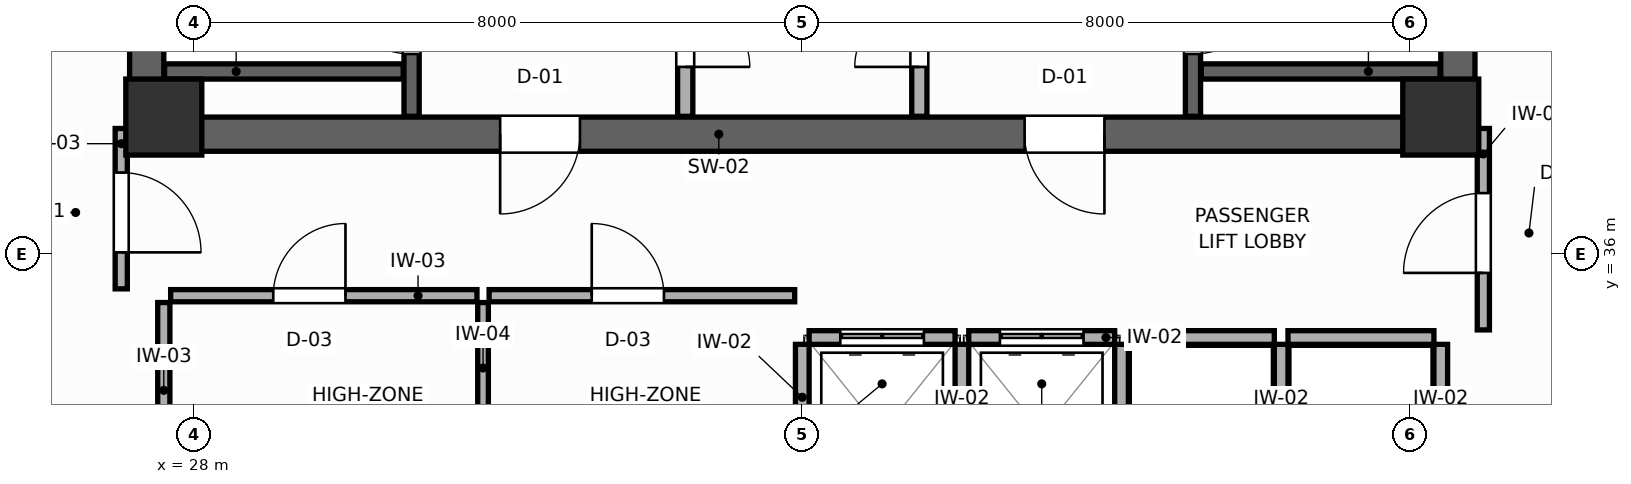
"""IFC4 building model, lengths in metres.
Left out: names, types, materials, properties, quantities, classifications, styles, units other than length and angle.
Written with IfcOpenShell. Run it as: python <this file> out.ifc"""

import sys

from ifc_helpers import new_model, si_unit, direction, frame, frame_2d, origin, origin_2d, place, context, subcontext, project, spatial, rectangle, extrude, source, transform, mapped, element, fill, save


model = new_model("IFC4")
c1 = context("Model", 3, precision=1e-05, world=origin(), true_north=direction((0.0, 1.0)))
c2 = subcontext(c1, "Body", "Model", "MODEL_VIEW")
j1 = project(units=[si_unit("LENGTHUNIT", "METRE"), si_unit("PLANEANGLEUNIT", "RADIAN")], contexts=[c1])
p1 = place(None, origin())
s1 = spatial("IfcSite", under=j1, at=p1, CompositionType="ELEMENT")
p2 = place(p1, origin())
s2 = spatial("IfcBuilding", under=s1, at=p2, CompositionType="ELEMENT")
p3 = place(p2, frame((0.0, 0.0, 175.8)))
s3 = spatial("IfcBuildingStorey", under=s2, at=p3, CompositionType="ELEMENT", Elevation=175.8)
p4 = place(p3, frame((27.15, 37.575, 0.0), z_axis=(0.0, 0.0, 1.0), x_axis=(1.0, 0.0, 0.0)))
e1 = element("IfcWall", 1, at=p4, inside=s3, PredefinedType="SHEAR", context=c2, shape_type="SweptSolid", body=[
    extrude(rectangle(XDim=17.7, YDim=0.45, at=frame_2d((8.85, 0.0))), origin(), (0.0, 0.0, 1.0), 3.6),
])
p5 = place(p4, frame((4.875, 0.0, 0.0)))
e2 = element("IfcOpeningElement", 2, at=p5, cuts=e1, PredefinedType="OPENING", context=c2, shape_type="SweptSolid", body=[
    extrude(rectangle(XDim=1.05, YDim=2.1, at=frame_2d((0.525, 1.05))), frame((0.0, 0.235, 0.0), z_axis=(0.0, -1.0, 0.0), x_axis=(1.0, 0.0, 0.0)), (0.0, 0.0, 1.0), 0.47),
])
p6 = place(p4, frame((11.775, 0.0, 0.0)))
e3 = element("IfcOpeningElement", 3, at=p6, cuts=e1, PredefinedType="OPENING", context=c2, shape_type="SweptSolid", body=[
    extrude(rectangle(XDim=1.05, YDim=2.1, at=frame_2d((0.525, 1.05))), frame((0.0, 0.235, 0.0), z_axis=(0.0, -1.0, 0.0), x_axis=(1.0, 0.0, 0.0)), (0.0, 0.0, 1.0), 0.47),
])
for number, where, z_axis, x_axis in (
    (4, (27.375, 37.8, 0.0), (0.0, 0.0, 1.0), (0.0, 1.0, 0.0)),
    (5, (44.625, 37.8, 0.0), (0.0, 0.0, 1.0), (0.0, 1.0, 0.0)),
):
    element("IfcWall", number, at=place(p3, frame(where, z_axis=z_axis, x_axis=x_axis)), inside=s3, PredefinedType="SHEAR", context=c2, shape_type="SweptSolid", body=[
        extrude(rectangle(XDim=9.0, YDim=0.45, at=frame_2d((4.5, 0.0))), origin(), (0.0, 0.0, 1.0), 3.6),
    ])
m1 = source(origin(), c2, "Body", "SweptSolid", [
    extrude(rectangle(XDim=1.0, YDim=1.0, at=origin_2d()), origin(), (0.0, 0.0, 1.0), 3.6),
])
for number, where, z_axis, x_axis in (
    (6, (27.6, 37.8, 0.0), (0.0, 0.0, 1.0), (1.0, 0.0, 0.0)),
    (7, (44.4, 37.8, 0.0), (0.0, 0.0, 1.0), (1.0, 0.0, 0.0)),
):
    element("IfcColumn", number, at=place(p3, frame(where, z_axis=z_axis, x_axis=x_axis)), inside=s3, PredefinedType="COLUMN", context=c2, shape_type="MappedRepresentation", body=[
        mapped(m1, transform((0.0, 0.0, 0.0), scale=1.0)),
    ])
p7 = place(p3, frame((30.86, 37.81, 0.0), z_axis=(0.0, 0.0, 1.0), x_axis=(0.0, 1.0, 0.0)))
e8 = element("IfcWall", 8, at=p7, inside=s3, PredefinedType="SHEAR", context=c2, shape_type="SweptSolid", body=[
    extrude(rectangle(XDim=8.98, YDim=0.2, at=frame_2d((4.49, 0.0))), origin(), (0.0, 0.0, 1.0), 3.6),
])
p8 = place(p7, frame((0.82, 0.0, 0.0)))
e9 = element("IfcOpeningElement", 9, at=p8, cuts=e8, PredefinedType="OPENING", context=c2, shape_type="SweptSolid", body=[
    extrude(rectangle(XDim=1.05, YDim=2.1, at=frame_2d((0.525, 1.05))), frame((0.0, 0.11, 0.0), z_axis=(0.0, -1.0, 0.0), x_axis=(1.0, 0.0, 0.0)), (0.0, 0.0, 1.0), 0.22),
])
p9 = place(p3, frame((27.61, 38.4, 0.0), z_axis=(0.0, 0.0, 1.0), x_axis=(1.0, 0.0, 0.0)))
e10 = element("IfcWall", 10, at=p9, inside=s3, PredefinedType="SHEAR", context=c2, shape_type="SweptSolid", body=[
    extrude(rectangle(XDim=3.14, YDim=0.2, at=frame_2d((1.57, 0.0))), origin(), (0.0, 0.0, 1.0), 3.6),
])
p10 = place(p3, frame((41.14, 37.81, 0.0), z_axis=(0.0, 0.0, 1.0), x_axis=(0.0, 1.0, 0.0)))
e11 = element("IfcWall", 11, at=p10, inside=s3, PredefinedType="SHEAR", context=c2, shape_type="SweptSolid", body=[
    extrude(rectangle(XDim=8.98, YDim=0.2, at=frame_2d((4.49, 0.0))), origin(), (0.0, 0.0, 1.0), 3.6),
])
p11 = place(p10, frame((0.82, 0.0, 0.0)))
e12 = element("IfcOpeningElement", 12, at=p11, cuts=e11, PredefinedType="OPENING", context=c2, shape_type="SweptSolid", body=[
    extrude(rectangle(XDim=1.05, YDim=2.1, at=frame_2d((0.525, 1.05))), frame((0.0, 0.11, 0.0), z_axis=(0.0, -1.0, 0.0), x_axis=(1.0, 0.0, 0.0)), (0.0, 0.0, 1.0), 0.22),
])
p12 = place(p3, frame((41.25, 38.4, 0.0), z_axis=(0.0, 0.0, 1.0), x_axis=(1.0, 0.0, 0.0)))
e13 = element("IfcWall", 13, at=p12, inside=s3, PredefinedType="SHEAR", context=c2, shape_type="SweptSolid", body=[
    extrude(rectangle(XDim=3.14, YDim=0.2, at=frame_2d((1.57, 0.0))), origin(), (0.0, 0.0, 1.0), 3.6),
])
p13 = place(p3, frame((34.46, 37.81, 0.0), z_axis=(0.0, 0.0, 1.0), x_axis=(0.0, 1.0, 0.0)))
e14 = element("IfcWall", 14, at=p13, inside=s3, PredefinedType="PARTITIONING", context=c2, shape_type="SweptSolid", body=[
    extrude(rectangle(XDim=8.98, YDim=0.2, at=frame_2d((4.49, 0.0))), origin(), (0.0, 0.0, 1.0), 3.4),
])
p14 = place(p13, frame((0.65, 0.0, 0.0)))
e15 = element("IfcOpeningElement", 15, at=p14, cuts=e14, PredefinedType="OPENING", context=c2, shape_type="SweptSolid", body=[
    extrude(rectangle(XDim=0.85, YDim=2.05, at=frame_2d((0.425, 1.025))), frame((0.0, 0.11, 0.0), z_axis=(0.0, -1.0, 0.0), x_axis=(1.0, 0.0, 0.0)), (0.0, 0.0, 1.0), 0.22),
])
p15 = place(p3, frame((37.54, 37.81, 0.0), z_axis=(0.0, 0.0, 1.0), x_axis=(0.0, 1.0, 0.0)))
e16 = element("IfcWall", 16, at=p15, inside=s3, PredefinedType="PARTITIONING", context=c2, shape_type="SweptSolid", body=[
    extrude(rectangle(XDim=8.98, YDim=0.2, at=frame_2d((4.49, 0.0))), origin(), (0.0, 0.0, 1.0), 3.4),
])
p16 = place(p15, frame((0.65, 0.0, 0.0)))
e17 = element("IfcOpeningElement", 17, at=p16, cuts=e16, PredefinedType="OPENING", context=c2, shape_type="SweptSolid", body=[
    extrude(rectangle(XDim=0.85, YDim=2.05, at=frame_2d((0.425, 1.025))), frame((0.0, 0.11, 0.0), z_axis=(0.0, -1.0, 0.0), x_axis=(1.0, 0.0, 0.0)), (0.0, 0.0, 1.0), 0.22),
])
p17 = place(p3, frame((36.09, 34.9, 0.0), z_axis=(0.0, 0.0, 1.0), x_axis=(1.0, 0.0, 0.0)))
e18 = element("IfcWall", 18, at=p17, inside=s3, PredefinedType="PARTITIONING", context=c2, shape_type="SweptSolid", body=[
    extrude(rectangle(XDim=1.92, YDim=0.18, at=frame_2d((0.96, 0.0))), origin(), (0.0, 0.0, 1.0), 3.4),
])
p18 = place(p17, frame((0.41, 0.0, 0.0)))
e19 = element("IfcOpeningElement", 19, at=p18, cuts=e18, PredefinedType="OPENING", context=c2, shape_type="SweptSolid", body=[
    extrude(rectangle(XDim=1.1, YDim=2.1, at=frame_2d((0.55, 1.05))), frame((0.0, 0.1, 0.0), z_axis=(0.0, -1.0, 0.0), x_axis=(1.0, 0.0, 0.0)), (0.0, 0.0, 1.0), 0.2),
])
p19 = place(p3, frame((36.0, 32.49, 0.0), z_axis=(0.0, 0.0, 1.0), x_axis=(0.0, 1.0, 0.0)))
e20 = element("IfcWall", 20, at=p19, inside=s3, PredefinedType="PARTITIONING", context=c2, shape_type="SweptSolid", body=[
    extrude(rectangle(XDim=2.32, YDim=0.18, at=frame_2d((1.16, 0.0))), origin(), (0.0, 0.0, 1.0), 3.4),
])
p20 = place(p3, frame((38.19, 34.9, 0.0), z_axis=(0.0, 0.0, 1.0), x_axis=(1.0, 0.0, 0.0)))
e21 = element("IfcWall", 21, at=p20, inside=s3, PredefinedType="PARTITIONING", context=c2, shape_type="SweptSolid", body=[
    extrude(rectangle(XDim=1.92, YDim=0.18, at=frame_2d((0.96, 0.0))), origin(), (0.0, 0.0, 1.0), 3.4),
])
p21 = place(p20, frame((0.41, 0.0, 0.0)))
e22 = element("IfcOpeningElement", 22, at=p21, cuts=e21, PredefinedType="OPENING", context=c2, shape_type="SweptSolid", body=[
    extrude(rectangle(XDim=1.1, YDim=2.1, at=frame_2d((0.55, 1.05))), frame((0.0, 0.1, 0.0), z_axis=(0.0, -1.0, 0.0), x_axis=(1.0, 0.0, 0.0)), (0.0, 0.0, 1.0), 0.2),
])
p22 = place(p3, frame((38.1, 32.49, 0.0), z_axis=(0.0, 0.0, 1.0), x_axis=(0.0, 1.0, 0.0)))
e23 = element("IfcWall", 23, at=p22, inside=s3, PredefinedType="PARTITIONING", context=c2, shape_type="SweptSolid", body=[
    extrude(rectangle(XDim=2.32, YDim=0.18, at=frame_2d((1.16, 0.0))), origin(), (0.0, 0.0, 1.0), 3.4),
])
p23 = place(p3, frame((40.29, 34.9, 0.0), z_axis=(0.0, 0.0, 1.0), x_axis=(1.0, 0.0, 0.0)))
e24 = element("IfcWall", 24, at=p23, inside=s3, PredefinedType="PARTITIONING", context=c2, shape_type="SweptSolid", body=[
    extrude(rectangle(XDim=1.92, YDim=0.18, at=frame_2d((0.96, 0.0))), origin(), (0.0, 0.0, 1.0), 3.4),
])
p24 = place(p3, frame((40.2, 32.49, 0.0), z_axis=(0.0, 0.0, 1.0), x_axis=(0.0, 1.0, 0.0)))
e25 = element("IfcWall", 25, at=p24, inside=s3, PredefinedType="PARTITIONING", context=c2, shape_type="SweptSolid", body=[
    extrude(rectangle(XDim=2.32, YDim=0.18, at=frame_2d((1.16, 0.0))), origin(), (0.0, 0.0, 1.0), 3.4),
])
p25 = place(p3, frame((42.39, 34.9, 0.0), z_axis=(0.0, 0.0, 1.0), x_axis=(1.0, 0.0, 0.0)))
e26 = element("IfcWall", 26, at=p25, inside=s3, PredefinedType="PARTITIONING", context=c2, shape_type="SweptSolid", body=[
    extrude(rectangle(XDim=1.92, YDim=0.18, at=frame_2d((0.96, 0.0))), origin(), (0.0, 0.0, 1.0), 3.4),
])
for number, where, z_axis, x_axis in (
    (27, (42.3, 32.49, 0.0), (0.0, 0.0, 1.0), (0.0, 1.0, 0.0)),
    (28, (44.4, 32.49, 0.0), (0.0, 0.0, 1.0), (0.0, 1.0, 0.0)),
):
    element("IfcWall", number, at=place(p3, frame(where, z_axis=z_axis, x_axis=x_axis)), inside=s3, PredefinedType="PARTITIONING", context=c2, shape_type="SweptSolid", body=[
        extrude(rectangle(XDim=2.32, YDim=0.18, at=frame_2d((1.16, 0.0))), origin(), (0.0, 0.0, 1.0), 3.4),
    ])
p26 = place(p3, frame((27.6, 33.05, 0.0), z_axis=(0.0, 0.0, 1.0), x_axis=(0.0, 1.0, 0.0)))
e29 = element("IfcWall", 29, at=p26, inside=s3, PredefinedType="PARTITIONING", context=c2, shape_type="SweptSolid", body=[
    extrude(rectangle(XDim=2.31, YDim=0.16, at=frame_2d((1.155, 0.0))), origin(), (0.0, 0.0, 1.0), 3.4),
])
p27 = place(p3, frame((31.8, 32.49, 0.0), z_axis=(0.0, 0.0, 1.0), x_axis=(0.0, 1.0, 0.0)))
e30 = element("IfcWall", 30, at=p27, inside=s3, PredefinedType="PARTITIONING", context=c2, shape_type="SweptSolid", body=[
    extrude(rectangle(XDim=2.87, YDim=0.14, at=frame_2d((1.435, 0.0))), origin(), (0.0, 0.0, 1.0), 3.4),
])
p28 = place(p3, frame((27.69, 35.45, 0.0), z_axis=(0.0, 0.0, 1.0), x_axis=(1.0, 0.0, 0.0)))
e31 = element("IfcWall", 31, at=p28, inside=s3, PredefinedType="PARTITIONING", context=c2, shape_type="SweptSolid", body=[
    extrude(rectangle(XDim=4.03, YDim=0.16, at=frame_2d((2.015, 0.0))), origin(), (0.0, 0.0, 1.0), 3.4),
])
p29 = place(p28, frame((1.35, 0.0, 0.0)))
e32 = element("IfcOpeningElement", 32, at=p29, cuts=e31, PredefinedType="OPENING", context=c2, shape_type="SweptSolid", body=[
    extrude(rectangle(XDim=0.95, YDim=2.05, at=frame_2d((0.475, 1.025))), frame((0.0, 0.09, 0.0), z_axis=(0.0, -1.0, 0.0), x_axis=(1.0, 0.0, 0.0)), (0.0, 0.0, 1.0), 0.18),
])
p30 = place(p3, frame((31.88, 35.45, 0.0), z_axis=(0.0, 0.0, 1.0), x_axis=(1.0, 0.0, 0.0)))
e33 = element("IfcWall", 33, at=p30, inside=s3, PredefinedType="PARTITIONING", context=c2, shape_type="SweptSolid", body=[
    extrude(rectangle(XDim=4.02, YDim=0.16, at=frame_2d((2.01, 0.0))), origin(), (0.0, 0.0, 1.0), 3.4),
])
p31 = place(p30, frame((1.35, 0.0, 0.0)))
e34 = element("IfcOpeningElement", 34, at=p31, cuts=e33, PredefinedType="OPENING", context=c2, shape_type="SweptSolid", body=[
    extrude(rectangle(XDim=0.95, YDim=2.05, at=frame_2d((0.475, 1.025))), frame((0.0, 0.09, 0.0), z_axis=(0.0, -1.0, 0.0), x_axis=(1.0, 0.0, 0.0)), (0.0, 0.0, 1.0), 0.18),
])
p32 = place(p3, frame((27.04, 35.54, 0.0), z_axis=(0.0, 0.0, 1.0), x_axis=(0.0, 1.0, 0.0)))
e35 = element("IfcWall", 35, at=p32, inside=s3, PredefinedType="PARTITIONING", context=c2, shape_type="SweptSolid", body=[
    extrude(rectangle(XDim=2.11, YDim=0.16, at=frame_2d((1.055, 0.0))), origin(), (0.0, 0.0, 1.0), 3.4),
])
p33 = place(p32, frame((0.48, 0.0, 0.0)))
e36 = element("IfcOpeningElement", 36, at=p33, cuts=e35, PredefinedType="OPENING", context=c2, shape_type="SweptSolid", body=[
    extrude(rectangle(XDim=1.05, YDim=2.1, at=frame_2d((0.525, 1.05))), frame((0.0, 0.09, 0.0), z_axis=(0.0, -1.0, 0.0), x_axis=(1.0, 0.0, 0.0)), (0.0, 0.0, 1.0), 0.18),
])
p34 = place(p3, frame((44.96, 35.0, 0.0), z_axis=(0.0, 0.0, 1.0), x_axis=(0.0, 1.0, 0.0)))
e37 = element("IfcWall", 37, at=p34, inside=s3, PredefinedType="PARTITIONING", context=c2, shape_type="SweptSolid", body=[
    extrude(rectangle(XDim=2.65, YDim=0.16, at=frame_2d((1.325, 0.0))), origin(), (0.0, 0.0, 1.0), 3.4),
])
p35 = place(p34, frame((0.75, 0.0, 0.0)))
e38 = element("IfcOpeningElement", 38, at=p35, cuts=e37, PredefinedType="OPENING", context=c2, shape_type="SweptSolid", body=[
    extrude(rectangle(XDim=1.05, YDim=2.1, at=frame_2d((0.525, 1.05))), frame((0.0, 0.09, 0.0), z_axis=(0.0, -1.0, 0.0), x_axis=(1.0, 0.0, 0.0)), (0.0, 0.0, 1.0), 0.18),
])
p36 = place(p8, origin())
e39 = element("IfcDoor", 39, at=p36, inside=s3, OperationType="SINGLE_SWING_RIGHT", PredefinedType="DOOR", context=c2, shape_type="SweptSolid", body=[
    extrude(rectangle(XDim=1.05, YDim=2.1, at=frame_2d((0.525, 1.05))), frame((0.0, 0.025, 0.0), z_axis=(0.0, -1.0, 0.0), x_axis=(1.0, 0.0, 0.0)), (0.0, 0.0, 1.0), 0.05),
])
fill(e9, e39)
p37 = place(p11, frame((1.05, 0.0, 0.0), z_axis=(0.0, 0.0, 1.0), x_axis=(-1.0, 0.0, 0.0)))
e40 = element("IfcDoor", 40, at=p37, inside=s3, OperationType="SINGLE_SWING_LEFT", PredefinedType="DOOR", context=c2, shape_type="SweptSolid", body=[
    extrude(rectangle(XDim=1.05, YDim=2.1, at=frame_2d((0.525, 1.05))), frame((0.0, 0.025, 0.0), z_axis=(0.0, -1.0, 0.0), x_axis=(1.0, 0.0, 0.0)), (0.0, 0.0, 1.0), 0.05),
])
fill(e12, e40)
p38 = place(p14, frame((0.85, 0.0, 0.0), z_axis=(0.0, 0.0, 1.0), x_axis=(-1.0, 0.0, 0.0)))
e41 = element("IfcDoor", 41, at=p38, inside=s3, OperationType="SINGLE_SWING_RIGHT", PredefinedType="DOOR", context=c2, shape_type="SweptSolid", body=[
    extrude(rectangle(XDim=0.85, YDim=2.05, at=frame_2d((0.425, 1.025))), frame((0.0, 0.025, 0.0), z_axis=(0.0, -1.0, 0.0), x_axis=(1.0, 0.0, 0.0)), (0.0, 0.0, 1.0), 0.05),
])
fill(e15, e41)
p39 = place(p16, origin())
e42 = element("IfcDoor", 42, at=p39, inside=s3, OperationType="SINGLE_SWING_LEFT", PredefinedType="DOOR", context=c2, shape_type="SweptSolid", body=[
    extrude(rectangle(XDim=0.85, YDim=2.05, at=frame_2d((0.425, 1.025))), frame((0.0, 0.025, 0.0), z_axis=(0.0, -1.0, 0.0), x_axis=(1.0, 0.0, 0.0)), (0.0, 0.0, 1.0), 0.05),
])
fill(e17, e42)
p40 = place(p18, origin())
e43 = element("IfcDoor", 43, at=p40, inside=s3, OperationType="DOUBLE_DOOR_SLIDING", PredefinedType="DOOR", context=c2, shape_type="SweptSolid", body=[
    extrude(rectangle(XDim=1.1, YDim=2.1, at=frame_2d((0.55, 1.05))), frame((0.0, 0.025, 0.0), z_axis=(0.0, -1.0, 0.0), x_axis=(1.0, 0.0, 0.0)), (0.0, 0.0, 1.0), 0.05),
])
fill(e19, e43)
p41 = place(p21, origin())
e44 = element("IfcDoor", 44, at=p41, inside=s3, OperationType="DOUBLE_DOOR_SLIDING", PredefinedType="DOOR", context=c2, shape_type="SweptSolid", body=[
    extrude(rectangle(XDim=1.1, YDim=2.1, at=frame_2d((0.55, 1.05))), frame((0.0, 0.025, 0.0), z_axis=(0.0, -1.0, 0.0), x_axis=(1.0, 0.0, 0.0)), (0.0, 0.0, 1.0), 0.05),
])
fill(e22, e44)
p42 = place(p29, origin())
e45 = element("IfcDoor", 45, at=p42, inside=s3, OperationType="SINGLE_SWING_RIGHT", PredefinedType="DOOR", context=c2, shape_type="SweptSolid", body=[
    extrude(rectangle(XDim=0.95, YDim=2.05, at=frame_2d((0.475, 1.025))), frame((0.0, 0.025, 0.0), z_axis=(0.0, -1.0, 0.0), x_axis=(1.0, 0.0, 0.0)), (0.0, 0.0, 1.0), 0.05),
])
fill(e32, e45)
p43 = place(p31, origin())
e46 = element("IfcDoor", 46, at=p43, inside=s3, OperationType="SINGLE_SWING_LEFT", PredefinedType="DOOR", context=c2, shape_type="SweptSolid", body=[
    extrude(rectangle(XDim=0.95, YDim=2.05, at=frame_2d((0.475, 1.025))), frame((0.0, 0.025, 0.0), z_axis=(0.0, -1.0, 0.0), x_axis=(1.0, 0.0, 0.0)), (0.0, 0.0, 1.0), 0.05),
])
fill(e34, e46)
p44 = place(p33, frame((1.05, 0.0, 0.0), z_axis=(0.0, 0.0, 1.0), x_axis=(-1.0, 0.0, 0.0)))
e47 = element("IfcDoor", 47, at=p44, inside=s3, OperationType="SINGLE_SWING_RIGHT", PredefinedType="DOOR", context=c2, shape_type="SweptSolid", body=[
    extrude(rectangle(XDim=1.05, YDim=2.1, at=frame_2d((0.525, 1.05))), frame((0.0, 0.025, 0.0), z_axis=(0.0, -1.0, 0.0), x_axis=(1.0, 0.0, 0.0)), (0.0, 0.0, 1.0), 0.05),
])
fill(e36, e47)
p45 = place(p35, origin())
e48 = element("IfcDoor", 48, at=p45, inside=s3, OperationType="SINGLE_SWING_LEFT", PredefinedType="DOOR", context=c2, shape_type="SweptSolid", body=[
    extrude(rectangle(XDim=1.05, YDim=2.1, at=frame_2d((0.525, 1.05))), frame((0.0, 0.025, 0.0), z_axis=(0.0, -1.0, 0.0), x_axis=(1.0, 0.0, 0.0)), (0.0, 0.0, 1.0), 0.05),
])
fill(e38, e48)
p46 = place(p5, frame((1.05, 0.0, 0.0), z_axis=(0.0, 0.0, 1.0), x_axis=(-1.0, 0.0, 0.0)))
e49 = element("IfcDoor", 49, at=p46, inside=s3, OperationType="SINGLE_SWING_RIGHT", PredefinedType="DOOR", context=c2, shape_type="SweptSolid", body=[
    extrude(rectangle(XDim=1.05, YDim=2.1, at=frame_2d((0.525, 1.05))), frame((0.0, 0.025, 0.0), z_axis=(0.0, -1.0, 0.0), x_axis=(1.0, 0.0, 0.0)), (0.0, 0.0, 1.0), 0.05),
])
fill(e2, e49)
p47 = place(p6, frame((1.05, 0.0, 0.0), z_axis=(0.0, 0.0, 1.0), x_axis=(-1.0, 0.0, 0.0)))
e50 = element("IfcDoor", 50, at=p47, inside=s3, OperationType="SINGLE_SWING_LEFT", PredefinedType="DOOR", context=c2, shape_type="SweptSolid", body=[
    extrude(rectangle(XDim=1.05, YDim=2.1, at=frame_2d((0.525, 1.05))), frame((0.0, 0.025, 0.0), z_axis=(0.0, -1.0, 0.0), x_axis=(1.0, 0.0, 0.0)), (0.0, 0.0, 1.0), 0.05),
])
fill(e3, e50)
save(model, sys.argv[1])
